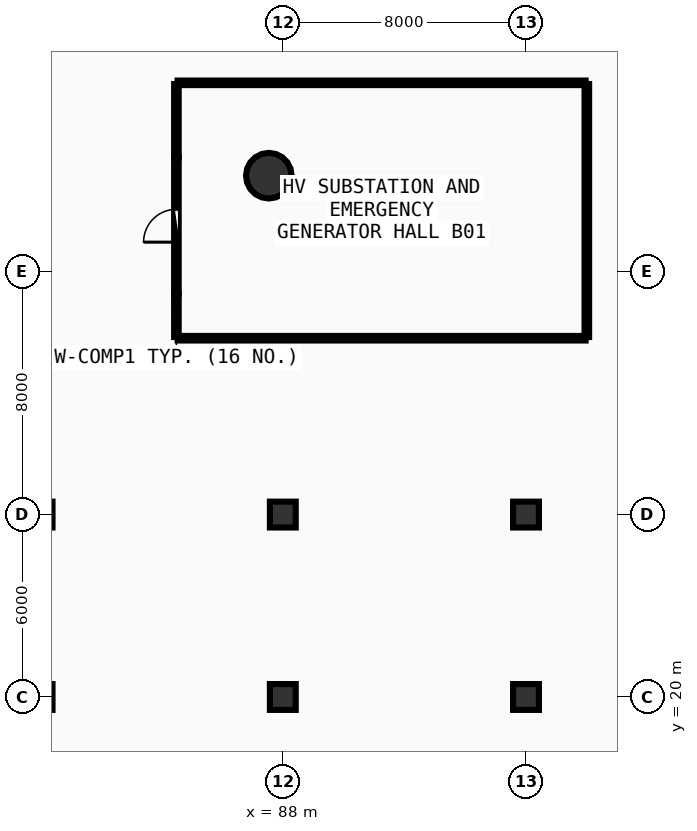
"""IFC4 building model, lengths in metres.
Left out: names, types, materials, properties, quantities, classifications, styles, units other than length and angle.
Written with IfcOpenShell. Run it as: python <this file> out.ifc"""

import sys

from ifc_helpers import new_model, si_unit, direction, frame, frame_2d, origin, origin_2d, place, context, subcontext, project, spatial, rectangle, circle, extrude, element, fill, save


model = new_model("IFC4")
c1 = context("Model", 3, precision=1e-05, world=origin(), true_north=direction((0.0, 1.0)))
c2 = subcontext(c1, "Body", "Model", "MODEL_VIEW")
j1 = project(units=[si_unit("LENGTHUNIT", "METRE"), si_unit("PLANEANGLEUNIT", "RADIAN")], contexts=[c1])
p1 = place(None, origin())
s1 = spatial("IfcSite", under=j1, at=p1, CompositionType="ELEMENT")
p2 = place(p1, origin())
s2 = spatial("IfcBuilding", under=s1, at=p2, CompositionType="ELEMENT")
p3 = place(p2, frame((0.0, 0.0, -4.2)))
s3 = spatial("IfcBuildingStorey", under=s2, at=p3, CompositionType="ELEMENT", Elevation=-4.2)
p4 = place(p3, frame((87.54, 37.146, 0.0), z_axis=(0.0, 0.0, 1.0), x_axis=(1.0, 0.0, 0.0)))
e1 = element("IfcColumn", 1, at=p4, inside=s3, PredefinedType="COLUMN", context=c2, shape_type="SweptSolid", body=[
    extrude(circle(Radius=0.75, at=origin_2d()), origin(), (0.0, 0.0, 1.0), 4.2),
])
for number, where, z_axis, x_axis in (
    (2, (80.0, 20.0, 0.0), (0.0, 0.0, 1.0), (1.0, 0.0, 0.0)),
    (3, (80.0, 26.0, 0.0), (0.0, 0.0, 1.0), (1.0, 0.0, 0.0)),
    (4, (88.0, 20.0, 0.0), (0.0, 0.0, 1.0), (1.0, 0.0, 0.0)),
    (5, (88.0, 26.0, 0.0), (0.0, 0.0, 1.0), (1.0, 0.0, 0.0)),
    (6, (96.0, 20.0, 0.0), (0.0, 0.0, 1.0), (1.0, 0.0, 0.0)),
    (7, (96.0, 26.0, 0.0), (0.0, 0.0, 1.0), (1.0, 0.0, 0.0)),
):
    element("IfcColumn", number, at=place(p3, frame(where, z_axis=z_axis, x_axis=x_axis)), inside=s3, PredefinedType="COLUMN", context=c2, shape_type="SweptSolid", body=[
        extrude(rectangle(XDim=0.85, YDim=0.85, at=origin_2d()), origin(), (0.0, 0.0, 1.0), 4.2),
    ])
p5 = place(p3, frame((84.5, 33.26, 0.0), z_axis=(0.0, 0.0, 1.0), x_axis=(0.0, 1.0, 0.0)))
e8 = element("IfcWall", 8, at=p5, inside=s3, PredefinedType="PARTITIONING", context=c2, shape_type="SweptSolid", body=[
    extrude(rectangle(XDim=4.48, YDim=0.15, at=frame_2d((2.24, 0.0))), origin(), (0.0, 0.0, 1.0), 3.285),
])
p6 = place(p5, frame((1.7, 0.0, 0.0)))
e9 = element("IfcOpeningElement", 9, at=p6, cuts=e8, PredefinedType="OPENING", context=c2, shape_type="SweptSolid", body=[
    extrude(rectangle(XDim=1.08, YDim=2.1, at=frame_2d((0.54, 1.05))), frame((0.0, 0.085, 0.0), z_axis=(0.0, -1.0, 0.0), x_axis=(1.0, 0.0, 0.0)), (0.0, 0.0, 1.0), 0.17),
])
p7 = place(p3, frame((84.54, 31.8, 0.0), z_axis=(0.0, 0.0, 1.0), x_axis=(1.0, 0.0, 0.0)))
e10 = element("IfcWall", 10, at=p7, inside=s3, PredefinedType="PARTITIONING", context=c2, shape_type="SweptSolid", body=[
    extrude(rectangle(XDim=13.42, YDim=0.15, at=frame_2d((6.71, 0.0))), origin(), (0.0, 0.0, 1.0), 3.89),
])
p8 = place(p3, frame((98.0, 31.84, 0.0), z_axis=(0.0, 0.0, 1.0), x_axis=(0.0, 1.0, 0.0)))
e11 = element("IfcWall", 11, at=p8, inside=s3, PredefinedType="PARTITIONING", context=c2, shape_type="SweptSolid", body=[
    extrude(rectangle(XDim=8.32, YDim=0.15, at=frame_2d((4.16, 0.0))), origin(), (0.0, 0.0, 1.0), 3.89),
])
p9 = place(p3, frame((97.96, 40.2, 0.0), z_axis=(0.0, 0.0, 1.0), x_axis=(-1.0, 0.0, 0.0)))
e12 = element("IfcWall", 12, at=p9, inside=s3, PredefinedType="PARTITIONING", context=c2, shape_type="SweptSolid", body=[
    extrude(rectangle(XDim=13.42, YDim=0.15, at=frame_2d((6.71, 0.0))), origin(), (0.0, 0.0, 1.0), 3.285),
])
p10 = place(p3, frame((84.5, 40.16, 0.0), z_axis=(0.0, 0.0, 1.0), x_axis=(0.0, -1.0, 0.0)))
e13 = element("IfcWall", 13, at=p10, inside=s3, PredefinedType="PARTITIONING", context=c2, shape_type="SweptSolid", body=[
    extrude(rectangle(XDim=2.42, YDim=0.15, at=frame_2d((1.21, 0.0))), origin(), (0.0, 0.0, 1.0), 3.645),
])
p11 = place(p3, frame((84.5, 33.26, 0.0), z_axis=(0.0, 0.0, 1.0), x_axis=(0.0, -1.0, 0.0)))
e14 = element("IfcWall", 14, at=p11, inside=s3, PredefinedType="PARTITIONING", context=c2, shape_type="SweptSolid", body=[
    extrude(rectangle(XDim=1.42, YDim=0.15, at=frame_2d((0.71, 0.0))), origin(), (0.0, 0.0, 1.0), 3.89),
])
p12 = place(p6, origin())
e15 = element("IfcDoor", 15, at=p12, inside=s3, OperationType="SINGLE_SWING_LEFT", PredefinedType="DOOR", context=c2, shape_type="SweptSolid", body=[
    extrude(rectangle(XDim=1.08, YDim=2.1, at=frame_2d((0.54, 1.05))), frame((0.0, 0.025, 0.0), z_axis=(0.0, -1.0, 0.0), x_axis=(1.0, 0.0, 0.0)), (0.0, 0.0, 1.0), 0.05),
])
fill(e9, e15)
save(model, sys.argv[1])
